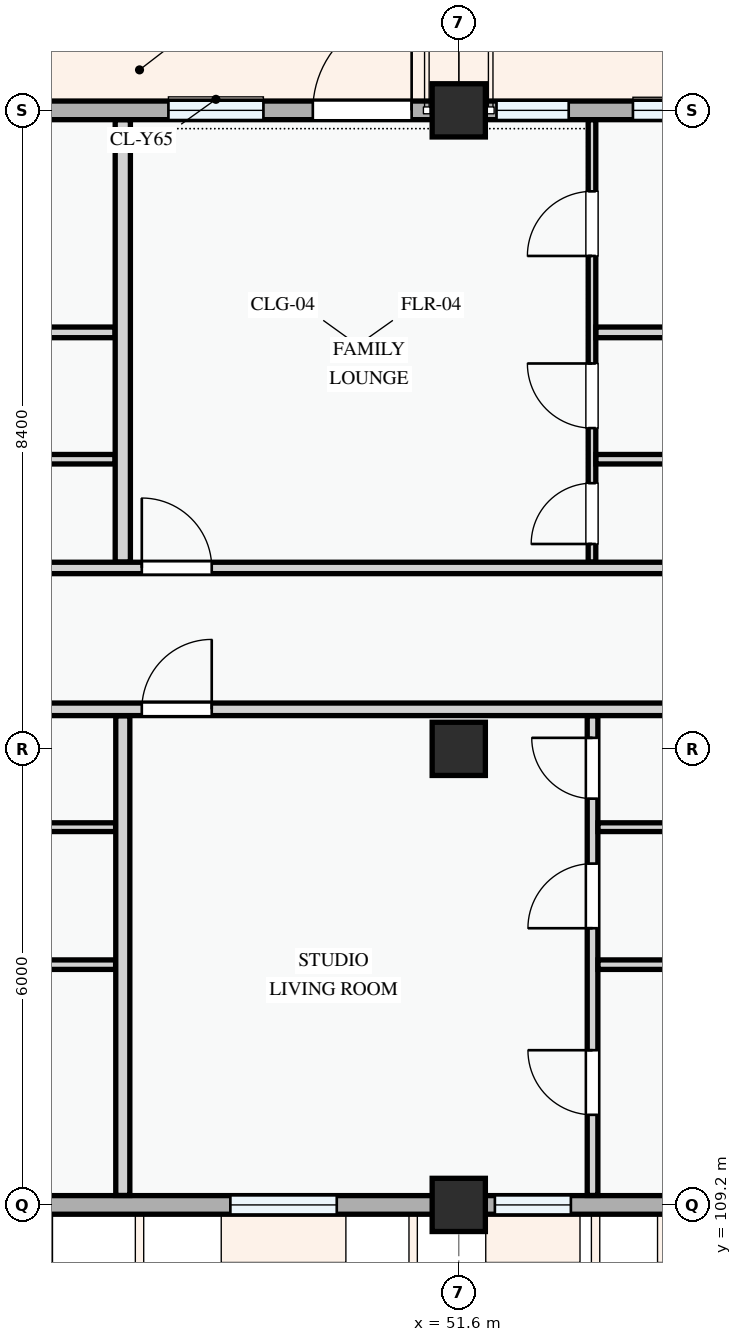
"""IFC4 building model, lengths in metres.
Left out: names, types, materials, properties, quantities, classifications, styles, units other than length and angle.
Written with IfcOpenShell. Run it as: python <this file> out.ifc"""

import sys

from ifc_helpers import new_model, si_unit, direction, frame, frame_2d, origin, origin_2d, place, context, subcontext, project, spatial, rectangle, extrude, element, fill, save


model = new_model("IFC4")
c1 = context("Model", 3, precision=1e-05, world=origin(), true_north=direction((0.0, 1.0)))
c2 = subcontext(c1, "Body", "Model", "MODEL_VIEW")
j1 = project(units=[si_unit("LENGTHUNIT", "METRE"), si_unit("PLANEANGLEUNIT", "RADIAN")], contexts=[c1])
p1 = place(None, origin())
s1 = spatial("IfcSite", under=j1, at=p1, CompositionType="ELEMENT")
p2 = place(p1, origin())
s2 = spatial("IfcBuilding", under=s1, at=p2, CompositionType="ELEMENT")
p3 = place(p2, frame((0.0, 0.0, 8.1)))
s3 = spatial("IfcBuildingStorey", under=s2, at=p3, CompositionType="ELEMENT", Elevation=8.1)
for number, where, z_axis, x_axis in (
    (1, (51.6, 109.2, 0.0), (0.0, 0.0, 1.0), (1.0, 0.0, 0.0)),
    (2, (51.6, 115.2, 0.0), (0.0, 0.0, 1.0), (1.0, 0.0, 0.0)),
    (3, (51.6, 123.6, 0.0), (0.0, 0.0, 1.0), (1.0, 0.0, 0.0)),
):
    element("IfcColumn", number, at=place(p3, frame(where, z_axis=z_axis, x_axis=x_axis)), inside=s3, PredefinedType="COLUMN", context=c2, shape_type="SweptSolid", body=[
        extrude(rectangle(XDim=0.7, YDim=0.7, at=origin_2d()), origin(), (0.0, 0.0, 1.0), 3.3),
    ])
p4 = place(p3, frame((43.2, 109.2, 0.0), z_axis=(0.0, 0.0, 1.0), x_axis=(1.0, 0.0, 0.0)))
e4 = element("IfcWall", 4, at=p4, inside=s3, PredefinedType="STANDARD", context=c2, shape_type="SweptSolid", body=[
    extrude(rectangle(XDim=8.4, YDim=0.245, at=frame_2d((4.2, 0.0))), origin(), (0.0, 0.0, 1.0), 2.375),
])
p5 = place(p4, frame((1.635, 0.0, 0.78)))
e5 = element("IfcOpeningElement", 5, at=p5, cuts=e4, PredefinedType="OPENING", context=c2, shape_type="SweptSolid", body=[
    extrude(rectangle(XDim=0.9, YDim=1.2, at=frame_2d((0.45, 0.6))), frame((0.0, 0.133, 0.0), z_axis=(0.0, -1.0, 0.0), x_axis=(1.0, 0.0, 0.0)), (0.0, 0.0, 1.0), 0.265),
])
p6 = place(p4, frame((5.395, 0.0, 0.78)))
e6 = element("IfcOpeningElement", 6, at=p6, cuts=e4, PredefinedType="OPENING", context=c2, shape_type="SweptSolid", body=[
    extrude(rectangle(XDim=1.4, YDim=1.45, at=frame_2d((0.7, 0.725))), frame((0.0, 0.133, 0.0), z_axis=(0.0, -1.0, 0.0), x_axis=(1.0, 0.0, 0.0)), (0.0, 0.0, 1.0), 0.265),
])
p7 = place(p3, frame((51.6, 109.2, 0.0), z_axis=(0.0, 0.0, 1.0), x_axis=(1.0, 0.0, 0.0)))
e7 = element("IfcWall", 7, at=p7, inside=s3, PredefinedType="STANDARD", context=c2, shape_type="SweptSolid", body=[
    extrude(rectangle(XDim=6.0, YDim=0.245, at=frame_2d((3.0, 0.0))), origin(), (0.0, 0.0, 1.0), 2.475),
])
p8 = place(p7, frame((0.475, 0.0, 0.78)))
e8 = element("IfcOpeningElement", 8, at=p8, cuts=e7, PredefinedType="OPENING", context=c2, shape_type="SweptSolid", body=[
    extrude(rectangle(XDim=1.0, YDim=1.25, at=frame_2d((0.5, 0.625))), frame((0.0, 0.133, 0.0), z_axis=(0.0, -1.0, 0.0), x_axis=(1.0, 0.0, 0.0)), (0.0, 0.0, 1.0), 0.265),
])
p9 = place(p7, frame((2.735, 0.0, 0.78)))
e9 = element("IfcOpeningElement", 9, at=p9, cuts=e7, PredefinedType="OPENING", context=c2, shape_type="SweptSolid", body=[
    extrude(rectangle(XDim=2.1, YDim=1.55, at=frame_2d((1.05, 0.775))), frame((0.0, 0.133, 0.0), z_axis=(0.0, -1.0, 0.0), x_axis=(1.0, 0.0, 0.0)), (0.0, 0.0, 1.0), 0.265),
])
p10 = place(p3, frame((57.6, 123.6, 0.0), z_axis=(0.0, 0.0, 1.0), x_axis=(-1.0, 0.0, 0.0)))
e10 = element("IfcWall", 10, at=p10, inside=s3, PredefinedType="STANDARD", context=c2, shape_type="SweptSolid", body=[
    extrude(rectangle(XDim=6.0, YDim=0.245, at=frame_2d((3.0, 0.0))), origin(), (0.0, 0.0, 1.0), 2.445),
])
p11 = place(p10, frame((0.62, 0.0, 0.0)))
e11 = element("IfcOpeningElement", 11, at=p11, cuts=e10, PredefinedType="OPENING", context=c2, shape_type="SweptSolid", body=[
    extrude(rectangle(XDim=1.25, YDim=2.2, at=frame_2d((0.625, 1.1))), frame((0.0, 0.133, 0.0), z_axis=(0.0, -1.0, 0.0), x_axis=(1.0, 0.0, 0.0)), (0.0, 0.0, 1.0), 0.265),
])
p12 = place(p10, frame((2.458, 0.0, 0.78)))
e12 = element("IfcOpeningElement", 12, at=p12, cuts=e10, PredefinedType="OPENING", context=c2, shape_type="SweptSolid", body=[
    extrude(rectangle(XDim=1.25, YDim=1.45, at=frame_2d((0.625, 0.725))), frame((0.0, 0.133, 0.0), z_axis=(0.0, -1.0, 0.0), x_axis=(1.0, 0.0, 0.0)), (0.0, 0.0, 1.0), 0.265),
])
p13 = place(p10, frame((4.554, 0.0, 0.78)))
e13 = element("IfcOpeningElement", 13, at=p13, cuts=e10, PredefinedType="OPENING", context=c2, shape_type="SweptSolid", body=[
    extrude(rectangle(XDim=0.95, YDim=1.15, at=frame_2d((0.475, 0.575))), frame((0.0, 0.133, 0.0), z_axis=(0.0, -1.0, 0.0), x_axis=(1.0, 0.0, 0.0)), (0.0, 0.0, 1.0), 0.265),
])
p14 = place(p3, frame((51.6, 123.6, 0.0), z_axis=(0.0, 0.0, 1.0), x_axis=(-1.0, 0.0, 0.0)))
e14 = element("IfcWall", 14, at=p14, inside=s3, PredefinedType="STANDARD", context=c2, shape_type="SweptSolid", body=[
    extrude(rectangle(XDim=8.4, YDim=0.245, at=frame_2d((4.2, 0.0))), origin(), (0.0, 0.0, 1.0), 2.345),
])
p15 = place(p14, frame((0.62, 0.0, 0.0)))
e15 = element("IfcOpeningElement", 15, at=p15, cuts=e14, PredefinedType="OPENING", context=c2, shape_type="SweptSolid", body=[
    extrude(rectangle(XDim=1.3, YDim=2.15, at=frame_2d((0.65, 1.075))), frame((0.0, 0.133, 0.0), z_axis=(0.0, -1.0, 0.0), x_axis=(1.0, 0.0, 0.0)), (0.0, 0.0, 1.0), 0.265),
])
p16 = place(p14, frame((2.57, 0.0, 0.78)))
e16 = element("IfcOpeningElement", 16, at=p16, cuts=e14, PredefinedType="OPENING", context=c2, shape_type="SweptSolid", body=[
    extrude(rectangle(XDim=1.25, YDim=1.45, at=frame_2d((0.625, 0.725))), frame((0.0, 0.133, 0.0), z_axis=(0.0, -1.0, 0.0), x_axis=(1.0, 0.0, 0.0)), (0.0, 0.0, 1.0), 0.265),
])
p17 = place(p14, frame((5.54, 0.0, 0.78)))
e17 = element("IfcOpeningElement", 17, at=p17, cuts=e14, PredefinedType="OPENING", context=c2, shape_type="SweptSolid", body=[
    extrude(rectangle(XDim=1.55, YDim=1.4, at=frame_2d((0.775, 0.7))), frame((0.0, 0.133, 0.0), z_axis=(0.0, -1.0, 0.0), x_axis=(1.0, 0.0, 0.0)), (0.0, 0.0, 1.0), 0.265),
])
p18 = place(p3, frame((41.392, 112.361, 0.0), z_axis=(0.0, 0.0, 1.0), x_axis=(1.0, 0.0, 0.0)))
e18 = element("IfcWall", 18, at=p18, inside=s3, PredefinedType="PARTITIONING", context=c2, shape_type="SweptSolid", body=[
    extrude(rectangle(XDim=5.693, YDim=0.125, at=frame_2d((2.847, 0.0))), origin(), (0.0, 0.0, 1.0), 3.0),
])
p19 = place(p3, frame((41.392, 114.17, 0.0), z_axis=(0.0, 0.0, 1.0), x_axis=(1.0, 0.0, 0.0)))
e19 = element("IfcWall", 19, at=p19, inside=s3, PredefinedType="PARTITIONING", context=c2, shape_type="SweptSolid", body=[
    extrude(rectangle(XDim=5.693, YDim=0.115, at=frame_2d((2.847, 0.0))), origin(), (0.0, 0.0, 1.0), 3.0),
])
p20 = place(p3, frame((41.138, 120.679, 0.0), z_axis=(0.0, 0.0, 1.0), x_axis=(1.0, 0.0, 0.0)))
e20 = element("IfcWall", 20, at=p20, inside=s3, PredefinedType="PARTITIONING", context=c2, shape_type="SweptSolid", body=[
    extrude(rectangle(XDim=5.94, YDim=0.14, at=frame_2d((2.97, 0.0))), origin(), (0.0, 0.0, 1.0), 3.0),
])
p21 = place(p3, frame((41.138, 119.01, 0.0), z_axis=(0.0, 0.0, 1.0), x_axis=(1.0, 0.0, 0.0)))
e21 = element("IfcWall", 21, at=p21, inside=s3, PredefinedType="PARTITIONING", context=c2, shape_type="SweptSolid", body=[
    extrude(rectangle(XDim=5.94, YDim=0.125, at=frame_2d((2.97, 0.0))), origin(), (0.0, 0.0, 1.0), 3.0),
])
p22 = place(p3, frame((53.36, 109.324, 0.0), z_axis=(0.0, 0.0, 1.0), x_axis=(0.0, 1.0, 0.0)))
e22 = element("IfcWall", 22, at=p22, inside=s3, PredefinedType="PARTITIONING", context=c2, shape_type="SweptSolid", body=[
    extrude(rectangle(XDim=6.311, YDim=0.14, at=frame_2d((3.156, 0.0))), origin(), (0.0, 0.0, 1.0), 3.0),
])
p23 = place(p22, frame((1.061, 0.0, 0.0)))
e23 = element("IfcOpeningElement", 23, at=p23, cuts=e22, PredefinedType="OPENING", context=c2, shape_type="SweptSolid", body=[
    extrude(rectangle(XDim=0.85, YDim=2.1, at=frame_2d((0.425, 1.05))), frame((0.0, 0.08, 0.0), z_axis=(0.0, -1.0, 0.0), x_axis=(1.0, 0.0, 0.0)), (0.0, 0.0, 1.0), 0.16),
])
p24 = place(p22, frame((3.516, 0.0, 0.0)))
e24 = element("IfcOpeningElement", 24, at=p24, cuts=e22, PredefinedType="OPENING", context=c2, shape_type="SweptSolid", body=[
    extrude(rectangle(XDim=0.85, YDim=2.1, at=frame_2d((0.425, 1.05))), frame((0.0, 0.08, 0.0), z_axis=(0.0, -1.0, 0.0), x_axis=(1.0, 0.0, 0.0)), (0.0, 0.0, 1.0), 0.16),
])
p25 = place(p22, frame((5.22, 0.0, 0.0)))
e25 = element("IfcOpeningElement", 25, at=p25, cuts=e22, PredefinedType="OPENING", context=c2, shape_type="SweptSolid", body=[
    extrude(rectangle(XDim=0.8, YDim=2.1, at=frame_2d((0.4, 1.05))), frame((0.0, 0.08, 0.0), z_axis=(0.0, -1.0, 0.0), x_axis=(1.0, 0.0, 0.0)), (0.0, 0.0, 1.0), 0.16),
])
p26 = place(p3, frame((53.432, 112.361, 0.0), z_axis=(0.0, 0.0, 1.0), x_axis=(1.0, 0.0, 0.0)))
e26 = element("IfcWall", 26, at=p26, inside=s3, PredefinedType="PARTITIONING", context=c2, shape_type="SweptSolid", body=[
    extrude(rectangle(XDim=4.044, YDim=0.125, at=frame_2d((2.022, 0.0))), origin(), (0.0, 0.0, 1.0), 3.0),
])
p27 = place(p3, frame((53.432, 114.17, 0.0), z_axis=(0.0, 0.0, 1.0), x_axis=(1.0, 0.0, 0.0)))
e27 = element("IfcWall", 27, at=p27, inside=s3, PredefinedType="PARTITIONING", context=c2, shape_type="SweptSolid", body=[
    extrude(rectangle(XDim=4.044, YDim=0.115, at=frame_2d((2.022, 0.0))), origin(), (0.0, 0.0, 1.0), 3.0),
])
p28 = place(p3, frame((53.353, 117.657, 0.0), z_axis=(0.0, 0.0, 1.0), x_axis=(0.0, 1.0, 0.0)))
e28 = element("IfcWall", 28, at=p28, inside=s3, PredefinedType="PARTITIONING", context=c2, shape_type="SweptSolid", body=[
    extrude(rectangle(XDim=5.819, YDim=0.1, at=frame_2d((2.909, 0.0))), origin(), (0.0, 0.0, 1.0), 3.0),
])
p29 = place(p28, frame((0.238, 0.0, 0.0)))
e29 = element("IfcOpeningElement", 29, at=p29, cuts=e28, PredefinedType="OPENING", context=c2, shape_type="SweptSolid", body=[
    extrude(rectangle(XDim=0.8, YDim=2.1, at=frame_2d((0.4, 1.05))), frame((0.0, 0.06, 0.0), z_axis=(0.0, -1.0, 0.0), x_axis=(1.0, 0.0, 0.0)), (0.0, 0.0, 1.0), 0.12),
])
p30 = place(p28, frame((1.763, 0.0, 0.0)))
e30 = element("IfcOpeningElement", 30, at=p30, cuts=e28, PredefinedType="OPENING", context=c2, shape_type="SweptSolid", body=[
    extrude(rectangle(XDim=0.85, YDim=2.1, at=frame_2d((0.425, 1.05))), frame((0.0, 0.06, 0.0), z_axis=(0.0, -1.0, 0.0), x_axis=(1.0, 0.0, 0.0)), (0.0, 0.0, 1.0), 0.12),
])
p31 = place(p28, frame((4.028, 0.0, 0.0)))
e31 = element("IfcOpeningElement", 31, at=p31, cuts=e28, PredefinedType="OPENING", context=c2, shape_type="SweptSolid", body=[
    extrude(rectangle(XDim=0.85, YDim=2.1, at=frame_2d((0.425, 1.05))), frame((0.0, 0.06, 0.0), z_axis=(0.0, -1.0, 0.0), x_axis=(1.0, 0.0, 0.0)), (0.0, 0.0, 1.0), 0.12),
])
p32 = place(p3, frame((53.405, 120.679, 0.0), z_axis=(0.0, 0.0, 1.0), x_axis=(1.0, 0.0, 0.0)))
e32 = element("IfcWall", 32, at=p32, inside=s3, PredefinedType="PARTITIONING", context=c2, shape_type="SweptSolid", body=[
    extrude(rectangle(XDim=4.071, YDim=0.14, at=frame_2d((2.035, 0.0))), origin(), (0.0, 0.0, 1.0), 3.0),
])
p33 = place(p3, frame((53.405, 119.01, 0.0), z_axis=(0.0, 0.0, 1.0), x_axis=(1.0, 0.0, 0.0)))
e33 = element("IfcWall", 33, at=p33, inside=s3, PredefinedType="PARTITIONING", context=c2, shape_type="SweptSolid", body=[
    extrude(rectangle(XDim=4.071, YDim=0.125, at=frame_2d((2.035, 0.0))), origin(), (0.0, 0.0, 1.0), 3.0),
])
p34 = place(p3, frame((47.18, 109.324, 0.0), z_axis=(0.0, 0.0, 1.0), x_axis=(0.0, 1.0, 0.0)))
e34 = element("IfcWall", 34, at=p34, inside=s3, PredefinedType="PARTITIONING", context=c2, shape_type="SweptSolid", body=[
    extrude(rectangle(XDim=6.311, YDim=0.185, at=frame_2d((3.156, 0.0))), origin(), (0.0, 0.0, 1.0), 2.585),
])
p35 = place(p3, frame((47.18, 117.657, 0.0), z_axis=(0.0, 0.0, 1.0), x_axis=(0.0, 1.0, 0.0)))
e35 = element("IfcWall", 35, at=p35, inside=s3, PredefinedType="PARTITIONING", context=c2, shape_type="SweptSolid", body=[
    extrude(rectangle(XDim=5.819, YDim=0.2, at=frame_2d((2.909, 0.0))), origin(), (0.0, 0.0, 1.0), 2.585),
])
p36 = place(p3, frame((25.15, 115.72, 0.0), z_axis=(0.0, 0.0, 1.0), x_axis=(1.0, 0.0, 0.0)))
e36 = element("IfcWall", 36, at=p36, inside=s3, PredefinedType="PARTITIONING", context=c2, shape_type="SweptSolid", body=[
    extrude(rectangle(XDim=32.326, YDim=0.165, at=frame_2d((16.163, 0.0))), origin(), (0.0, 0.0, 1.0), 3.0),
])
p37 = place(p36, frame((0.25, 0.0, 0.0)))
e37 = element("IfcOpeningElement", 37, at=p37, cuts=e36, PredefinedType="OPENING", context=c2, shape_type="SweptSolid", body=[
    extrude(rectangle(XDim=0.92, YDim=2.1, at=frame_2d((0.46, 1.05))), frame((0.0, 0.093, 0.0), z_axis=(0.0, -1.0, 0.0), x_axis=(1.0, 0.0, 0.0)), (0.0, 0.0, 1.0), 0.185),
])
p38 = place(p36, frame((14.548, 0.0, 0.0)))
e38 = element("IfcOpeningElement", 38, at=p38, cuts=e36, PredefinedType="OPENING", context=c2, shape_type="SweptSolid", body=[
    extrude(rectangle(XDim=0.92, YDim=2.1, at=frame_2d((0.46, 1.05))), frame((0.0, 0.093, 0.0), z_axis=(0.0, -1.0, 0.0), x_axis=(1.0, 0.0, 0.0)), (0.0, 0.0, 1.0), 0.185),
])
p39 = place(p36, frame((22.28, 0.0, 0.0)))
e39 = element("IfcOpeningElement", 39, at=p39, cuts=e36, PredefinedType="OPENING", context=c2, shape_type="SweptSolid", body=[
    extrude(rectangle(XDim=0.92, YDim=2.1, at=frame_2d((0.46, 1.05))), frame((0.0, 0.093, 0.0), z_axis=(0.0, -1.0, 0.0), x_axis=(1.0, 0.0, 0.0)), (0.0, 0.0, 1.0), 0.185),
])
p40 = place(p3, frame((22.66, 117.58, 0.0), z_axis=(0.0, 0.0, 1.0), x_axis=(1.0, 0.0, 0.0)))
e40 = element("IfcWall", 40, at=p40, inside=s3, PredefinedType="PARTITIONING", context=c2, shape_type="SweptSolid", body=[
    extrude(rectangle(XDim=34.816, YDim=0.15, at=frame_2d((17.408, 0.0))), origin(), (0.0, 0.0, 1.0), 3.0),
])
p41 = place(p40, frame((2.74, 0.0, 0.0)))
e41 = element("IfcOpeningElement", 41, at=p41, cuts=e40, PredefinedType="OPENING", context=c2, shape_type="SweptSolid", body=[
    extrude(rectangle(XDim=0.92, YDim=2.1, at=frame_2d((0.46, 1.05))), frame((0.0, 0.085, 0.0), z_axis=(0.0, -1.0, 0.0), x_axis=(1.0, 0.0, 0.0)), (0.0, 0.0, 1.0), 0.17),
])
p42 = place(p40, frame((17.085, 0.0, 0.0)))
e42 = element("IfcOpeningElement", 42, at=p42, cuts=e40, PredefinedType="OPENING", context=c2, shape_type="SweptSolid", body=[
    extrude(rectangle(XDim=0.96, YDim=2.12, at=frame_2d((0.48, 1.06))), frame((0.0, 0.085, 0.0), z_axis=(0.0, -1.0, 0.0), x_axis=(1.0, 0.0, 0.0)), (0.0, 0.0, 1.0), 0.17),
])
p43 = place(p40, frame((24.77, 0.0, 0.0)))
e43 = element("IfcOpeningElement", 43, at=p43, cuts=e40, PredefinedType="OPENING", context=c2, shape_type="SweptSolid", body=[
    extrude(rectangle(XDim=0.92, YDim=2.1, at=frame_2d((0.46, 1.05))), frame((0.0, 0.085, 0.0), z_axis=(0.0, -1.0, 0.0), x_axis=(1.0, 0.0, 0.0)), (0.0, 0.0, 1.0), 0.17),
])
p44 = place(p6, origin())
e44 = element("IfcWindow", 44, at=p44, inside=s3, PartitioningType="SINGLE_PANEL", PredefinedType="WINDOW", context=c2, shape_type="SweptSolid", body=[
    extrude(rectangle(XDim=1.4, YDim=1.45, at=frame_2d((0.7, 0.725))), frame((0.0, 0.03, 0.0), z_axis=(0.0, -1.0, 0.0), x_axis=(1.0, 0.0, 0.0)), (0.0, 0.0, 1.0), 0.06),
])
fill(e6, e44)
p45 = place(p8, origin())
e45 = element("IfcWindow", 45, at=p45, inside=s3, PartitioningType="SINGLE_PANEL", PredefinedType="WINDOW", context=c2, shape_type="SweptSolid", body=[
    extrude(rectangle(XDim=1.0, YDim=1.25, at=frame_2d((0.5, 0.625))), frame((0.0, 0.03, 0.0), z_axis=(0.0, -1.0, 0.0), x_axis=(1.0, 0.0, 0.0)), (0.0, 0.0, 1.0), 0.06),
])
fill(e8, e45)
p46 = place(p12, origin())
e46 = element("IfcWindow", 46, at=p46, inside=s3, PartitioningType="SINGLE_PANEL", PredefinedType="WINDOW", context=c2, shape_type="SweptSolid", body=[
    extrude(rectangle(XDim=1.25, YDim=1.45, at=frame_2d((0.625, 0.725))), frame((0.0, 0.03, 0.0), z_axis=(0.0, -1.0, 0.0), x_axis=(1.0, 0.0, 0.0)), (0.0, 0.0, 1.0), 0.06),
])
fill(e12, e46)
p47 = place(p13, origin())
e47 = element("IfcWindow", 47, at=p47, inside=s3, PartitioningType="SINGLE_PANEL", PredefinedType="WINDOW", context=c2, shape_type="SweptSolid", body=[
    extrude(rectangle(XDim=0.95, YDim=1.15, at=frame_2d((0.475, 0.575))), frame((0.0, 0.03, 0.0), z_axis=(0.0, -1.0, 0.0), x_axis=(1.0, 0.0, 0.0)), (0.0, 0.0, 1.0), 0.06),
])
fill(e13, e47)
p48 = place(p15, frame((1.3, 0.0, 0.0), z_axis=(0.0, 0.0, 1.0), x_axis=(-1.0, 0.0, 0.0)))
e48 = element("IfcDoor", 48, at=p48, inside=s3, OperationType="SINGLE_SWING_RIGHT", PredefinedType="DOOR", context=c2, shape_type="SweptSolid", body=[
    extrude(rectangle(XDim=1.3, YDim=2.15, at=frame_2d((0.65, 1.075))), frame((0.0, 0.025, 0.0), z_axis=(0.0, -1.0, 0.0), x_axis=(1.0, 0.0, 0.0)), (0.0, 0.0, 1.0), 0.05),
])
fill(e15, e48)
p49 = place(p16, origin())
e49 = element("IfcWindow", 49, at=p49, inside=s3, PartitioningType="SINGLE_PANEL", PredefinedType="WINDOW", context=c2, shape_type="SweptSolid", body=[
    extrude(rectangle(XDim=1.25, YDim=1.45, at=frame_2d((0.625, 0.725))), frame((0.0, 0.03, 0.0), z_axis=(0.0, -1.0, 0.0), x_axis=(1.0, 0.0, 0.0)), (0.0, 0.0, 1.0), 0.06),
])
fill(e16, e49)
p50 = place(p23, origin())
e50 = element("IfcDoor", 50, at=p50, inside=s3, OperationType="SINGLE_SWING_RIGHT", PredefinedType="DOOR", context=c2, shape_type="SweptSolid", body=[
    extrude(rectangle(XDim=0.85, YDim=2.1, at=frame_2d((0.425, 1.05))), frame((0.0, 0.025, 0.0), z_axis=(0.0, -1.0, 0.0), x_axis=(1.0, 0.0, 0.0)), (0.0, 0.0, 1.0), 0.05),
])
fill(e23, e50)
p51 = place(p24, origin())
e51 = element("IfcDoor", 51, at=p51, inside=s3, OperationType="SINGLE_SWING_LEFT", PredefinedType="DOOR", context=c2, shape_type="SweptSolid", body=[
    extrude(rectangle(XDim=0.85, YDim=2.1, at=frame_2d((0.425, 1.05))), frame((0.0, 0.025, 0.0), z_axis=(0.0, -1.0, 0.0), x_axis=(1.0, 0.0, 0.0)), (0.0, 0.0, 1.0), 0.05),
])
fill(e24, e51)
p52 = place(p25, origin())
e52 = element("IfcDoor", 52, at=p52, inside=s3, OperationType="SINGLE_SWING_RIGHT", PredefinedType="DOOR", context=c2, shape_type="SweptSolid", body=[
    extrude(rectangle(XDim=0.8, YDim=2.1, at=frame_2d((0.4, 1.05))), frame((0.0, 0.025, 0.0), z_axis=(0.0, -1.0, 0.0), x_axis=(1.0, 0.0, 0.0)), (0.0, 0.0, 1.0), 0.05),
])
fill(e25, e52)
p53 = place(p29, origin())
e53 = element("IfcDoor", 53, at=p53, inside=s3, OperationType="SINGLE_SWING_LEFT", PredefinedType="DOOR", context=c2, shape_type="SweptSolid", body=[
    extrude(rectangle(XDim=0.8, YDim=2.1, at=frame_2d((0.4, 1.05))), frame((0.0, 0.025, 0.0), z_axis=(0.0, -1.0, 0.0), x_axis=(1.0, 0.0, 0.0)), (0.0, 0.0, 1.0), 0.05),
])
fill(e29, e53)
p54 = place(p30, origin())
e54 = element("IfcDoor", 54, at=p54, inside=s3, OperationType="SINGLE_SWING_RIGHT", PredefinedType="DOOR", context=c2, shape_type="SweptSolid", body=[
    extrude(rectangle(XDim=0.85, YDim=2.1, at=frame_2d((0.425, 1.05))), frame((0.0, 0.025, 0.0), z_axis=(0.0, -1.0, 0.0), x_axis=(1.0, 0.0, 0.0)), (0.0, 0.0, 1.0), 0.05),
])
fill(e30, e54)
p55 = place(p31, origin())
e55 = element("IfcDoor", 55, at=p55, inside=s3, OperationType="SINGLE_SWING_LEFT", PredefinedType="DOOR", context=c2, shape_type="SweptSolid", body=[
    extrude(rectangle(XDim=0.85, YDim=2.1, at=frame_2d((0.425, 1.05))), frame((0.0, 0.025, 0.0), z_axis=(0.0, -1.0, 0.0), x_axis=(1.0, 0.0, 0.0)), (0.0, 0.0, 1.0), 0.05),
])
fill(e31, e55)
p56 = place(p39, origin())
e56 = element("IfcDoor", 56, at=p56, inside=s3, OperationType="SINGLE_SWING_RIGHT", PredefinedType="DOOR", context=c2, shape_type="SweptSolid", body=[
    extrude(rectangle(XDim=0.92, YDim=2.1, at=frame_2d((0.46, 1.05))), frame((0.0, 0.025, 0.0), z_axis=(0.0, -1.0, 0.0), x_axis=(1.0, 0.0, 0.0)), (0.0, 0.0, 1.0), 0.05),
])
fill(e39, e56)
p57 = place(p43, origin())
e57 = element("IfcDoor", 57, at=p57, inside=s3, OperationType="SINGLE_SWING_LEFT", PredefinedType="DOOR", context=c2, shape_type="SweptSolid", body=[
    extrude(rectangle(XDim=0.92, YDim=2.1, at=frame_2d((0.46, 1.05))), frame((0.0, 0.025, 0.0), z_axis=(0.0, -1.0, 0.0), x_axis=(1.0, 0.0, 0.0)), (0.0, 0.0, 1.0), 0.05),
])
fill(e43, e57)
save(model, sys.argv[1])
